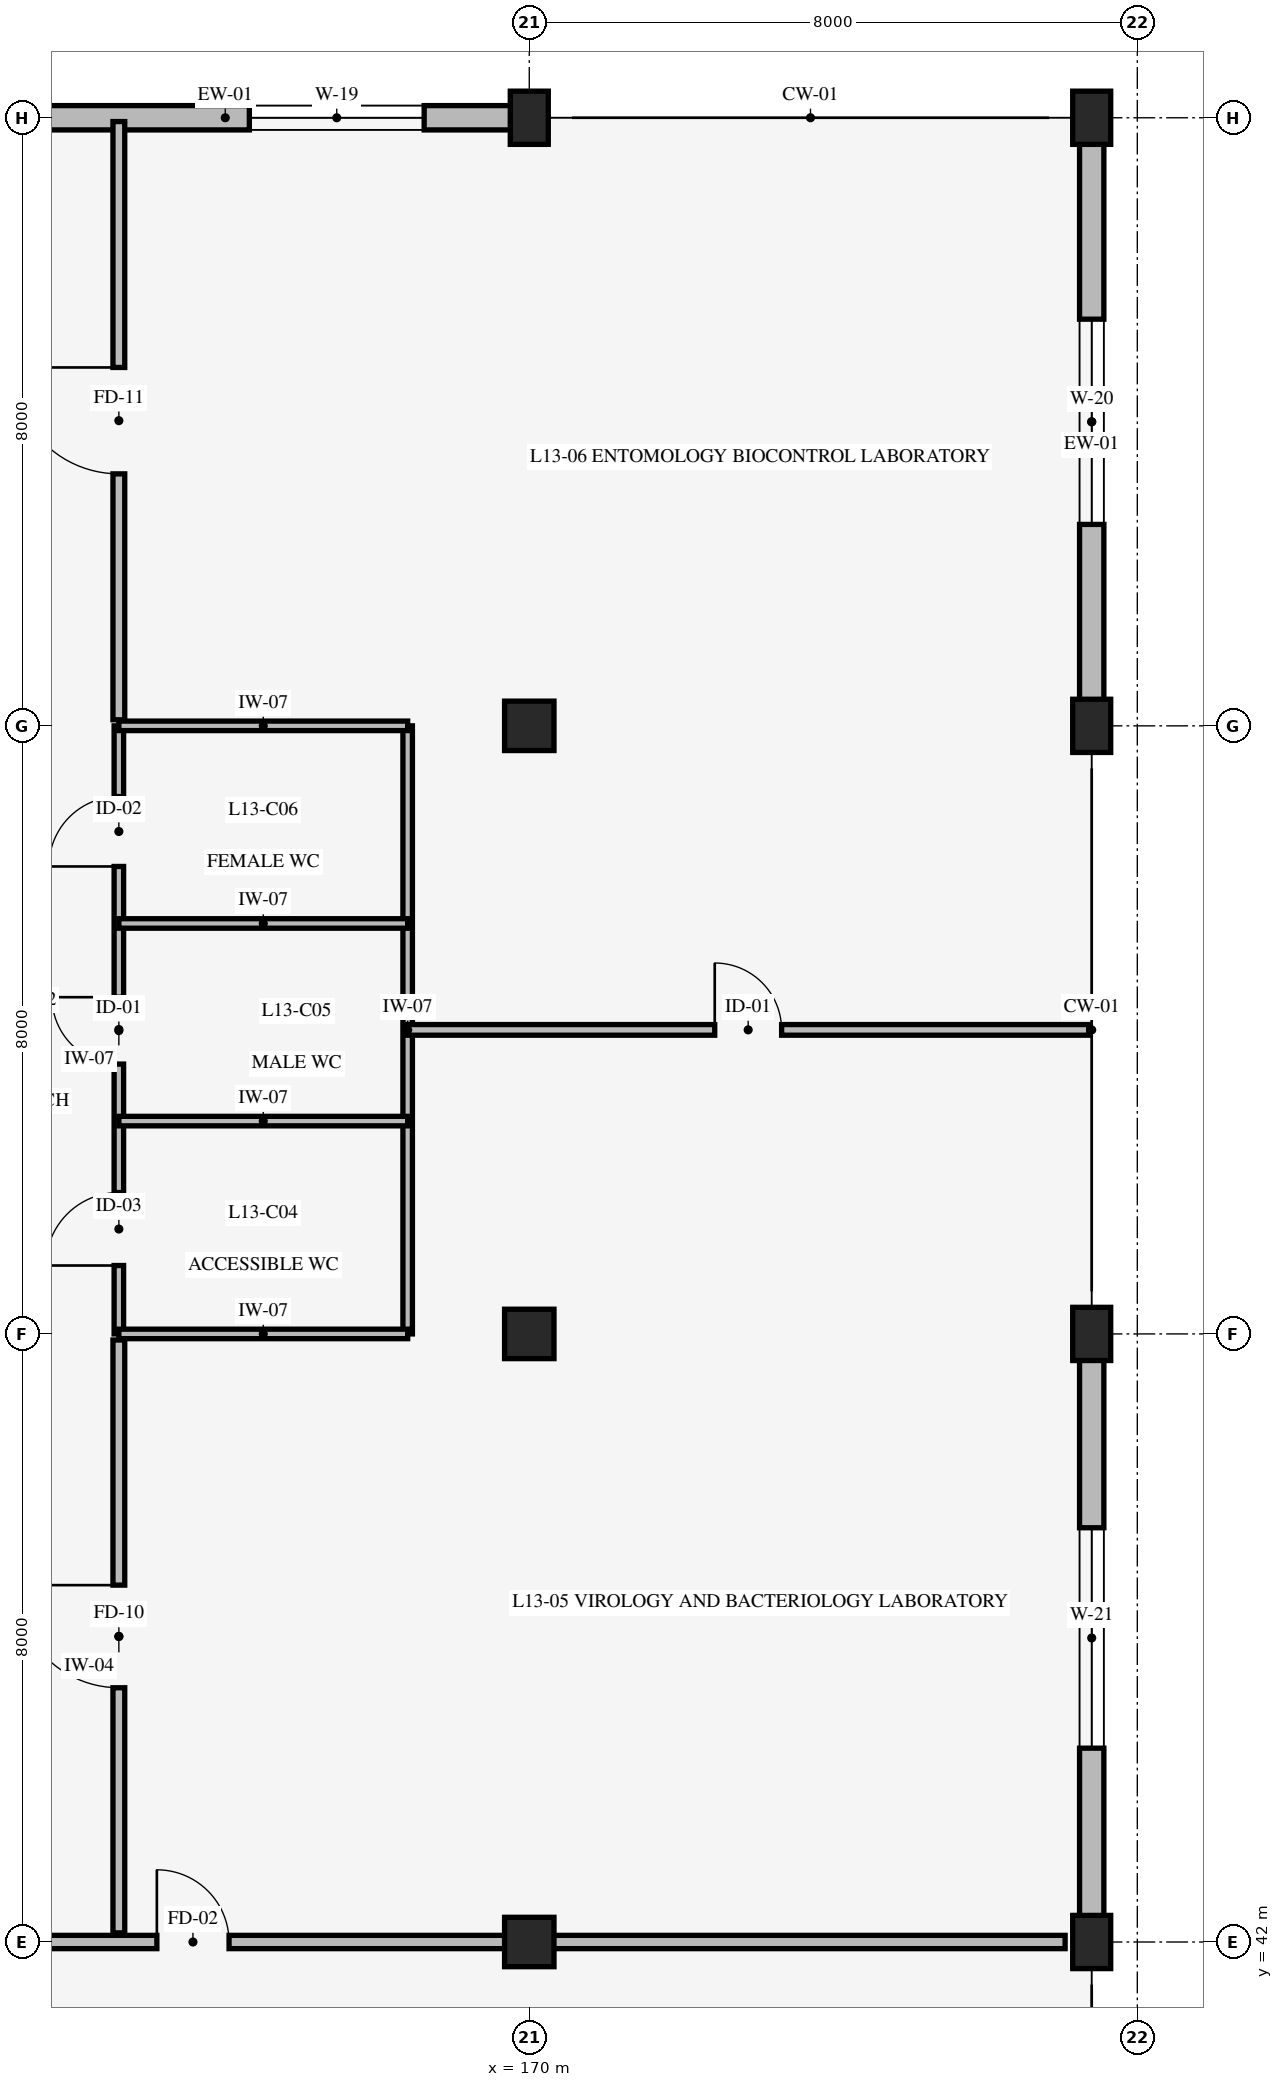
"""IFC4 building model, lengths in metres.
Left out: names, types, materials, properties, quantities, classifications, styles, units other than length and angle.
Written with IfcOpenShell. Run it as: python <this file> out.ifc"""

import sys

from ifc_helpers import new_model, si_unit, direction, frame, frame_2d, origin, origin_2d, place, context, subcontext, project, spatial, rectangle, extrude, element, fill, save


model = new_model("IFC4")
c1 = context("Model", 3, precision=1e-05, world=origin(), true_north=direction((0.0, 1.0)))
c2 = subcontext(c1, "Body", "Model", "MODEL_VIEW")
j1 = project(units=[si_unit("LENGTHUNIT", "METRE"), si_unit("PLANEANGLEUNIT", "RADIAN")], contexts=[c1])
p1 = place(None, origin())
s1 = spatial("IfcSite", under=j1, at=p1, CompositionType="ELEMENT")
p2 = place(p1, origin())
s2 = spatial("IfcBuilding", under=s1, at=p2, CompositionType="ELEMENT")
p3 = place(p2, frame((0.0, 0.0, 52.8)))
s3 = spatial("IfcBuildingStorey", under=s2, at=p3, CompositionType="ELEMENT", Elevation=52.8)
for number, where, z_axis, x_axis in (
    (1, (170.0, 42.0, 0.0), (0.0, 0.0, 1.0), (1.0, 0.0, 0.0)),
    (2, (170.0, 50.0, 0.0), (0.0, 0.0, 1.0), (1.0, 0.0, 0.0)),
    (3, (170.0, 58.0, 0.0), (0.0, 0.0, 1.0), (1.0, 0.0, 0.0)),
):
    element("IfcColumn", number, at=place(p3, frame(where, z_axis=z_axis, x_axis=x_axis)), inside=s3, PredefinedType="COLUMN", context=c2, shape_type="SweptSolid", body=[
        extrude(rectangle(XDim=0.65, YDim=0.65, at=origin_2d()), origin(), (0.0, 0.0, 1.0), 4.2),
    ])
for number, where, z_axis, x_axis in (
    (4, (170.0, 66.0, 0.0), (0.0, 0.0, 1.0), (1.0, 0.0, 0.0)),
    (5, (177.4, 42.0, 0.0), (0.0, 0.0, 1.0), (1.0, 0.0, 0.0)),
    (6, (177.4, 50.0, 0.0), (0.0, 0.0, 1.0), (1.0, 0.0, 0.0)),
    (7, (177.4, 58.0, 0.0), (0.0, 0.0, 1.0), (1.0, 0.0, 0.0)),
    (8, (177.4, 66.0, 0.0), (0.0, 0.0, 1.0), (1.0, 0.0, 0.0)),
):
    element("IfcColumn", number, at=place(p3, frame(where, z_axis=z_axis, x_axis=x_axis)), inside=s3, PredefinedType="COLUMN", context=c2, shape_type="SweptSolid", body=[
        extrude(rectangle(XDim=0.5, YDim=0.7, at=origin_2d()), origin(), (0.0, 0.0, 1.0), 4.2),
    ])
p4 = place(p3, frame((162.0, 66.0, 0.0), z_axis=(0.0, 0.0, 1.0), x_axis=(1.0, 0.0, 0.0)))
e9 = element("IfcWall", 9, at=p4, inside=s3, PredefinedType="STANDARD", context=c2, shape_type="SweptSolid", body=[
    extrude(rectangle(XDim=8.0, YDim=0.32, at=frame_2d((4.0, 0.0))), origin(), (0.0, 0.0, 1.0), 3.29),
])
p5 = place(p4, frame((4.317, 0.0, 0.85)))
e10 = element("IfcOpeningElement", 10, at=p5, cuts=e9, PredefinedType="OPENING", context=c2, shape_type="SweptSolid", body=[
    extrude(rectangle(XDim=2.3, YDim=1.5, at=frame_2d((1.15, 0.75))), frame((0.0, 0.17, 0.0), z_axis=(0.0, -1.0, 0.0), x_axis=(1.0, 0.0, 0.0)), (0.0, 0.0, 1.0), 0.34),
])
p6 = place(p3, frame((177.4, 66.0, 0.0), z_axis=(0.0, 0.0, 1.0), x_axis=(0.0, -1.0, 0.0)))
e11 = element("IfcWall", 11, at=p6, inside=s3, PredefinedType="STANDARD", context=c2, shape_type="SweptSolid", body=[
    extrude(rectangle(XDim=8.0, YDim=0.32, at=frame_2d((4.0, 0.0))), origin(), (0.0, 0.0, 1.0), 3.34),
])
p7 = place(p6, frame((2.65, 0.0, 0.85)))
e12 = element("IfcOpeningElement", 12, at=p7, cuts=e11, PredefinedType="OPENING", context=c2, shape_type="SweptSolid", body=[
    extrude(rectangle(XDim=2.7, YDim=1.8, at=frame_2d((1.35, 0.9))), frame((0.0, 0.17, 0.0), z_axis=(0.0, -1.0, 0.0), x_axis=(1.0, 0.0, 0.0)), (0.0, 0.0, 1.0), 0.34),
])
p8 = place(p3, frame((177.4, 50.0, 0.0), z_axis=(0.0, 0.0, 1.0), x_axis=(0.0, -1.0, 0.0)))
e13 = element("IfcWall", 13, at=p8, inside=s3, PredefinedType="STANDARD", context=c2, shape_type="SweptSolid", body=[
    extrude(rectangle(XDim=8.0, YDim=0.32, at=frame_2d((4.0, 0.0))), origin(), (0.0, 0.0, 1.0), 3.34),
])
p9 = place(p8, frame((2.55, 0.0, 0.85)))
e14 = element("IfcOpeningElement", 14, at=p9, cuts=e13, PredefinedType="OPENING", context=c2, shape_type="SweptSolid", body=[
    extrude(rectangle(XDim=2.9, YDim=1.7, at=frame_2d((1.45, 0.85))), frame((0.0, 0.17, 0.0), z_axis=(0.0, -1.0, 0.0), x_axis=(1.0, 0.0, 0.0)), (0.0, 0.0, 1.0), 0.34),
])
p10 = place(p3, frame((164.6, 50.0, 0.0), z_axis=(0.0, 0.0, 1.0), x_axis=(0.0, 1.0, 0.0)))
e15 = element("IfcWall", 15, at=p10, inside=s3, PredefinedType="STANDARD", context=c2, shape_type="SweptSolid", body=[
    extrude(rectangle(XDim=8.0, YDim=0.125, at=frame_2d((4.0, 0.0))), origin(), (0.0, 0.0, 1.0), 3.9),
])
p11 = place(p10, frame((0.9, 0.0, 0.0)))
e16 = element("IfcOpeningElement", 16, at=p11, cuts=e15, PredefinedType="OPENING", context=c2, shape_type="SweptSolid", body=[
    extrude(rectangle(XDim=0.96, YDim=2.08, at=frame_2d((0.48, 1.04))), frame((0.0, 0.073, 0.0), z_axis=(0.0, -1.0, 0.0), x_axis=(1.0, 0.0, 0.0)), (0.0, 0.0, 1.0), 0.145),
])
p12 = place(p10, frame((3.55, 0.0, 0.0)))
e17 = element("IfcOpeningElement", 17, at=p12, cuts=e15, PredefinedType="OPENING", context=c2, shape_type="SweptSolid", body=[
    extrude(rectangle(XDim=0.88, YDim=2.05, at=frame_2d((0.44, 1.025))), frame((0.0, 0.073, 0.0), z_axis=(0.0, -1.0, 0.0), x_axis=(1.0, 0.0, 0.0)), (0.0, 0.0, 1.0), 0.145),
])
p13 = place(p10, frame((6.15, 0.0, 0.0)))
e18 = element("IfcOpeningElement", 18, at=p13, cuts=e15, PredefinedType="OPENING", context=c2, shape_type="SweptSolid", body=[
    extrude(rectangle(XDim=0.92, YDim=2.05, at=frame_2d((0.46, 1.025))), frame((0.0, 0.073, 0.0), z_axis=(0.0, -1.0, 0.0), x_axis=(1.0, 0.0, 0.0)), (0.0, 0.0, 1.0), 0.145),
])
p14 = place(p3, frame((168.4, 50.0, 0.0), z_axis=(0.0, 0.0, 1.0), x_axis=(0.0, 1.0, 0.0)))
e19 = element("IfcWall", 19, at=p14, inside=s3, PredefinedType="STANDARD", context=c2, shape_type="SweptSolid", body=[
    extrude(rectangle(XDim=8.0, YDim=0.125, at=frame_2d((4.0, 0.0))), origin(), (0.0, 0.0, 1.0), 3.9),
])
p15 = place(p3, frame((164.6, 50.0, 0.0), z_axis=(0.0, 0.0, 1.0), x_axis=(1.0, 0.0, 0.0)))
e20 = element("IfcWall", 20, at=p15, inside=s3, PredefinedType="STANDARD", context=c2, shape_type="SweptSolid", body=[
    extrude(rectangle(XDim=3.8, YDim=0.125, at=frame_2d((1.9, 0.0))), origin(), (0.0, 0.0, 1.0), 3.29),
])
for number, where, z_axis, x_axis in (
    (21, (164.6, 52.8, 0.0), (0.0, 0.0, 1.0), (1.0, 0.0, 0.0)),
    (22, (164.6, 55.4, 0.0), (0.0, 0.0, 1.0), (1.0, 0.0, 0.0)),
):
    element("IfcWall", number, at=place(p3, frame(where, z_axis=z_axis, x_axis=x_axis)), inside=s3, PredefinedType="STANDARD", context=c2, shape_type="SweptSolid", body=[
        extrude(rectangle(XDim=3.8, YDim=0.125, at=frame_2d((1.9, 0.0))), origin(), (0.0, 0.0, 1.0), 3.9),
    ])
p16 = place(p3, frame((164.6, 58.0, 0.0), z_axis=(0.0, 0.0, 1.0), x_axis=(1.0, 0.0, 0.0)))
e23 = element("IfcWall", 23, at=p16, inside=s3, PredefinedType="STANDARD", context=c2, shape_type="SweptSolid", body=[
    extrude(rectangle(XDim=3.8, YDim=0.125, at=frame_2d((1.9, 0.0))), origin(), (0.0, 0.0, 1.0), 3.29),
])
p17 = place(p3, frame((164.6, 42.12, 0.0), z_axis=(0.0, 0.0, 1.0), x_axis=(0.0, 1.0, 0.0)))
e24 = element("IfcWall", 24, at=p17, inside=s3, PredefinedType="STANDARD", context=c2, shape_type="SweptSolid", body=[
    extrude(rectangle(XDim=7.8, YDim=0.155, at=frame_2d((3.9, 0.0))), origin(), (0.0, 0.0, 1.0), 3.9),
])
p18 = place(p17, frame((3.225, 0.0, 0.0)))
e25 = element("IfcOpeningElement", 25, at=p18, cuts=e24, PredefinedType="OPENING", context=c2, shape_type="SweptSolid", body=[
    extrude(rectangle(XDim=1.35, YDim=2.15, at=frame_2d((0.675, 1.075))), frame((0.0, 0.087, 0.0), z_axis=(0.0, -1.0, 0.0), x_axis=(1.0, 0.0, 0.0)), (0.0, 0.0, 1.0), 0.175),
])
p19 = place(p3, frame((168.4, 54.0, 0.0), z_axis=(0.0, 0.0, 1.0), x_axis=(1.0, 0.0, 0.0)))
e26 = element("IfcWall", 26, at=p19, inside=s3, PredefinedType="STANDARD", context=c2, shape_type="SweptSolid", body=[
    extrude(rectangle(XDim=8.96, YDim=0.14, at=frame_2d((4.48, 0.0))), origin(), (0.0, 0.0, 1.0), 3.9),
])
p20 = place(p19, frame((4.04, 0.0, 0.0)))
e27 = element("IfcOpeningElement", 27, at=p20, cuts=e26, PredefinedType="OPENING", context=c2, shape_type="SweptSolid", body=[
    extrude(rectangle(XDim=0.88, YDim=2.05, at=frame_2d((0.44, 1.025))), frame((0.0, 0.08, 0.0), z_axis=(0.0, -1.0, 0.0), x_axis=(1.0, 0.0, 0.0)), (0.0, 0.0, 1.0), 0.16),
])
p21 = place(p3, frame((164.6, 58.08, 0.0), z_axis=(0.0, 0.0, 1.0), x_axis=(0.0, 1.0, 0.0)))
e28 = element("IfcWall", 28, at=p21, inside=s3, PredefinedType="STANDARD", context=c2, shape_type="SweptSolid", body=[
    extrude(rectangle(XDim=7.87, YDim=0.155, at=frame_2d((3.935, 0.0))), origin(), (0.0, 0.0, 1.0), 3.9),
])
p22 = place(p21, frame((3.235, 0.0, 0.0)))
e29 = element("IfcOpeningElement", 29, at=p22, cuts=e28, PredefinedType="OPENING", context=c2, shape_type="SweptSolid", body=[
    extrude(rectangle(XDim=1.4, YDim=2.2, at=frame_2d((0.7, 1.1))), frame((0.0, 0.087, 0.0), z_axis=(0.0, -1.0, 0.0), x_axis=(1.0, 0.0, 0.0)), (0.0, 0.0, 1.0), 0.175),
])
p23 = place(p3, frame((162.35, 42.0, 0.0), z_axis=(0.0, 0.0, 1.0), x_axis=(1.0, 0.0, 0.0)))
e30 = element("IfcWall", 30, at=p23, inside=s3, PredefinedType="STANDARD", context=c2, shape_type="SweptSolid", body=[
    extrude(rectangle(XDim=14.7, YDim=0.175, at=frame_2d((7.35, 0.0))), origin(), (0.0, 0.0, 1.0), 3.29),
])
p24 = place(p23, frame((2.75, 0.0, 0.0)))
e31 = element("IfcOpeningElement", 31, at=p24, cuts=e30, PredefinedType="OPENING", context=c2, shape_type="SweptSolid", body=[
    extrude(rectangle(XDim=0.95, YDim=2.1, at=frame_2d((0.475, 1.05))), frame((0.0, 0.098, 0.0), z_axis=(0.0, -1.0, 0.0), x_axis=(1.0, 0.0, 0.0)), (0.0, 0.0, 1.0), 0.195),
])
p25 = place(p5, origin())
e32 = element("IfcWindow", 32, at=p25, inside=s3, PartitioningType="SINGLE_PANEL", PredefinedType="WINDOW", context=c2, shape_type="SweptSolid", body=[
    extrude(rectangle(XDim=2.3, YDim=1.5, at=frame_2d((1.15, 0.75))), frame((0.0, 0.03, 0.0), z_axis=(0.0, -1.0, 0.0), x_axis=(1.0, 0.0, 0.0)), (0.0, 0.0, 1.0), 0.06),
])
fill(e10, e32)
p26 = place(p7, origin())
e33 = element("IfcWindow", 33, at=p26, inside=s3, PartitioningType="SINGLE_PANEL", PredefinedType="WINDOW", context=c2, shape_type="SweptSolid", body=[
    extrude(rectangle(XDim=2.7, YDim=1.8, at=frame_2d((1.35, 0.9))), frame((0.0, 0.03, 0.0), z_axis=(0.0, -1.0, 0.0), x_axis=(1.0, 0.0, 0.0)), (0.0, 0.0, 1.0), 0.06),
])
fill(e12, e33)
p27 = place(p9, origin())
e34 = element("IfcWindow", 34, at=p27, inside=s3, PartitioningType="SINGLE_PANEL", PredefinedType="WINDOW", context=c2, shape_type="SweptSolid", body=[
    extrude(rectangle(XDim=2.9, YDim=1.7, at=frame_2d((1.45, 0.85))), frame((0.0, 0.03, 0.0), z_axis=(0.0, -1.0, 0.0), x_axis=(1.0, 0.0, 0.0)), (0.0, 0.0, 1.0), 0.06),
])
fill(e14, e34)
p28 = place(p11, origin())
e35 = element("IfcDoor", 35, at=p28, inside=s3, OperationType="SINGLE_SWING_LEFT", PredefinedType="DOOR", context=c2, shape_type="SweptSolid", body=[
    extrude(rectangle(XDim=0.96, YDim=2.08, at=frame_2d((0.48, 1.04))), frame((0.0, 0.025, 0.0), z_axis=(0.0, -1.0, 0.0), x_axis=(1.0, 0.0, 0.0)), (0.0, 0.0, 1.0), 0.05),
])
fill(e16, e35)
p29 = place(p12, origin())
e36 = element("IfcDoor", 36, at=p29, inside=s3, OperationType="SINGLE_SWING_RIGHT", PredefinedType="DOOR", context=c2, shape_type="SweptSolid", body=[
    extrude(rectangle(XDim=0.88, YDim=2.05, at=frame_2d((0.44, 1.025))), frame((0.0, 0.025, 0.0), z_axis=(0.0, -1.0, 0.0), x_axis=(1.0, 0.0, 0.0)), (0.0, 0.0, 1.0), 0.05),
])
fill(e17, e36)
p30 = place(p13, origin())
e37 = element("IfcDoor", 37, at=p30, inside=s3, OperationType="SINGLE_SWING_LEFT", PredefinedType="DOOR", context=c2, shape_type="SweptSolid", body=[
    extrude(rectangle(XDim=0.92, YDim=2.05, at=frame_2d((0.46, 1.025))), frame((0.0, 0.025, 0.0), z_axis=(0.0, -1.0, 0.0), x_axis=(1.0, 0.0, 0.0)), (0.0, 0.0, 1.0), 0.05),
])
fill(e18, e37)
p31 = place(p18, origin())
e38 = element("IfcDoor", 38, at=p31, inside=s3, OperationType="SINGLE_SWING_RIGHT", PredefinedType="DOOR", context=c2, shape_type="SweptSolid", body=[
    extrude(rectangle(XDim=1.35, YDim=2.15, at=frame_2d((0.675, 1.075))), frame((0.0, 0.025, 0.0), z_axis=(0.0, -1.0, 0.0), x_axis=(1.0, 0.0, 0.0)), (0.0, 0.0, 1.0), 0.05),
])
fill(e25, e38)
p32 = place(p20, origin())
e39 = element("IfcDoor", 39, at=p32, inside=s3, OperationType="SINGLE_SWING_LEFT", PredefinedType="DOOR", context=c2, shape_type="SweptSolid", body=[
    extrude(rectangle(XDim=0.88, YDim=2.05, at=frame_2d((0.44, 1.025))), frame((0.0, 0.025, 0.0), z_axis=(0.0, -1.0, 0.0), x_axis=(1.0, 0.0, 0.0)), (0.0, 0.0, 1.0), 0.05),
])
fill(e27, e39)
p33 = place(p22, origin())
e40 = element("IfcDoor", 40, at=p33, inside=s3, OperationType="SINGLE_SWING_RIGHT", PredefinedType="DOOR", context=c2, shape_type="SweptSolid", body=[
    extrude(rectangle(XDim=1.4, YDim=2.2, at=frame_2d((0.7, 1.1))), frame((0.0, 0.025, 0.0), z_axis=(0.0, -1.0, 0.0), x_axis=(1.0, 0.0, 0.0)), (0.0, 0.0, 1.0), 0.05),
])
fill(e29, e40)
p34 = place(p24, origin())
e41 = element("IfcDoor", 41, at=p34, inside=s3, OperationType="SINGLE_SWING_LEFT", PredefinedType="DOOR", context=c2, shape_type="SweptSolid", body=[
    extrude(rectangle(XDim=0.95, YDim=2.1, at=frame_2d((0.475, 1.05))), frame((0.0, 0.025, 0.0), z_axis=(0.0, -1.0, 0.0), x_axis=(1.0, 0.0, 0.0)), (0.0, 0.0, 1.0), 0.05),
])
fill(e31, e41)
save(model, sys.argv[1])
